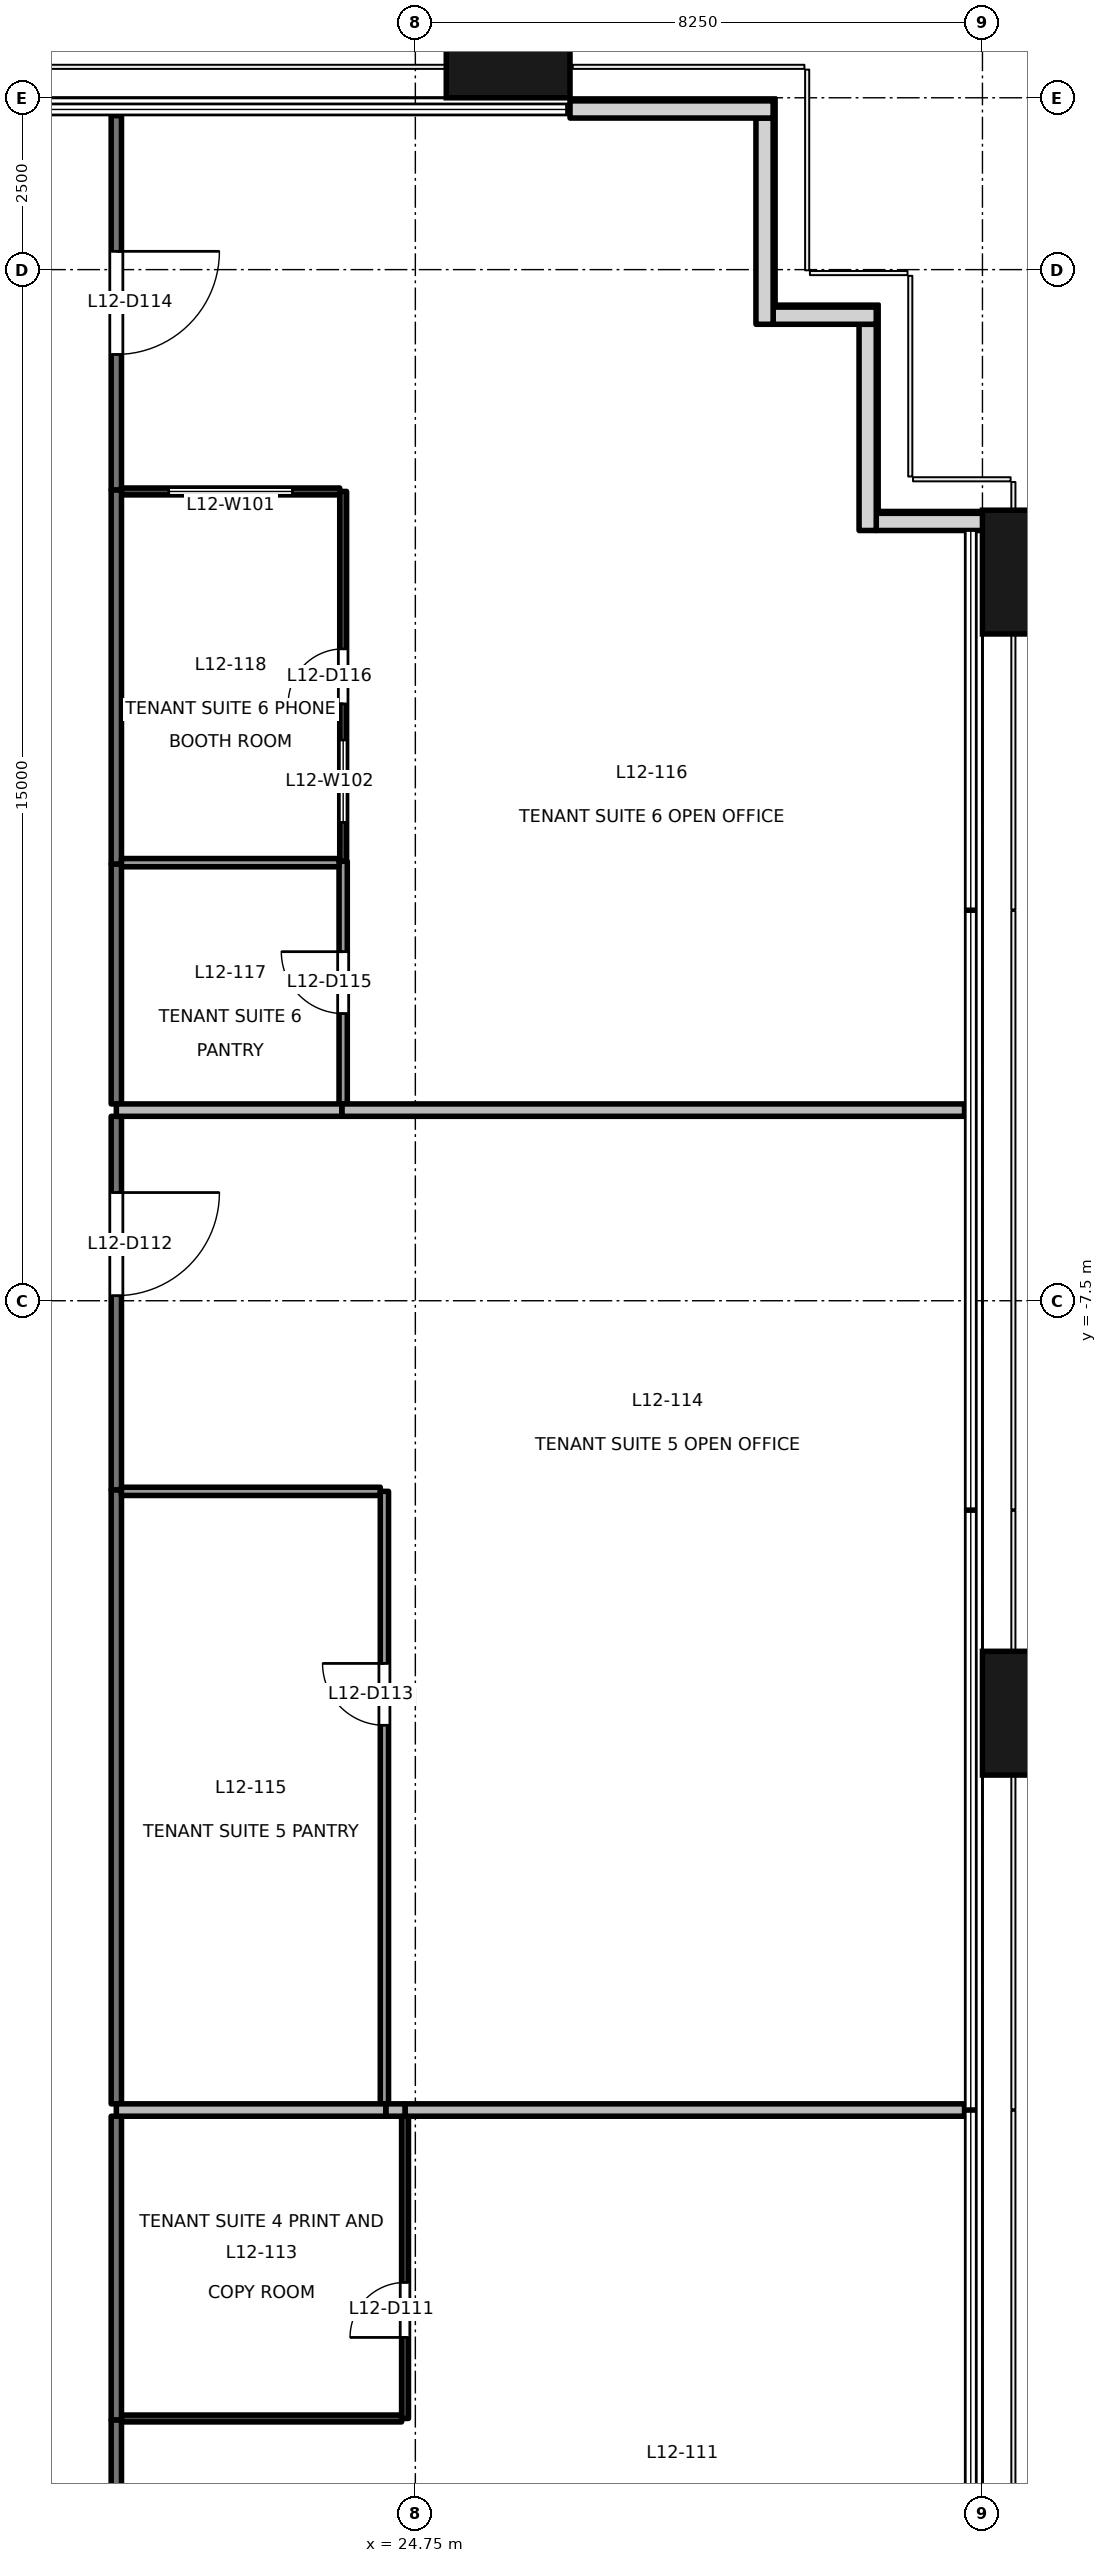
"""IFC4 building model, lengths in metres.
Left out: names, types, materials, properties, quantities, classifications, styles, units other than length and angle.
Written with IfcOpenShell. Run it as: python <this file> out.ifc"""

import sys

from ifc_helpers import new_model, si_unit, direction, frame, frame_2d, origin, origin_2d, place, context, subcontext, project, spatial, rectangle, extrude, element, fill, save


model = new_model("IFC4")
c1 = context("Model", 3, precision=1e-05, world=origin(), true_north=direction((0.0, 1.0)))
c2 = subcontext(c1, "Body", "Model", "MODEL_VIEW")
j1 = project(units=[si_unit("LENGTHUNIT", "METRE"), si_unit("PLANEANGLEUNIT", "RADIAN")], contexts=[c1])
p1 = place(None, origin())
s1 = spatial("IfcSite", under=j1, at=p1, CompositionType="ELEMENT")
p2 = place(p1, origin())
s2 = spatial("IfcBuilding", under=s1, at=p2, CompositionType="ELEMENT")
p3 = place(p2, frame((0.0, 0.0, 57.0)))
s3 = spatial("IfcBuildingStorey", under=s2, at=p3, CompositionType="ELEMENT", Elevation=57.0)
for number, where, z_axis, x_axis in (
    (1, (33.9, -13.5, -0.2), (0.0, 0.0, 1.0), (0.0, 1.0, 0.0)),
    (2, (33.9, 3.1, -0.2), (0.0, 0.0, 1.0), (0.0, 1.0, 0.0)),
    (3, (26.1, 10.9, -0.2), (0.0, 0.0, 1.0), (1.0, 0.0, 0.0)),
):
    element("IfcColumn", number, at=place(p3, frame(where, z_axis=z_axis, x_axis=x_axis)), inside=s3, PredefinedType="COLUMN", context=c2, shape_type="SweptSolid", body=[
        extrude(rectangle(XDim=1.8, YDim=1.8, at=origin_2d()), origin(), (0.0, 0.0, 1.0), 4.1),
    ])
p4 = place(p3, frame((33.005, 3.83, 0.0), z_axis=(0.0, 0.0, 1.0), x_axis=(-1.0, 0.0, 0.0)))
e4 = element("IfcWall", 4, at=p4, inside=s3, PredefinedType="SOLIDWALL", context=c2, shape_type="SweptSolid", body=[
    extrude(rectangle(XDim=1.55, YDim=0.25, at=frame_2d((0.775, 0.0))), origin(), (0.0, 0.0, 1.0), 3.9),
])
p5 = place(p3, frame((31.33, 3.705, 0.0), z_axis=(0.0, 0.0, 1.0), x_axis=(0.0, 1.0, 0.0)))
e5 = element("IfcWall", 5, at=p5, inside=s3, PredefinedType="SOLIDWALL", context=c2, shape_type="SweptSolid", body=[
    extrude(rectangle(XDim=3.0, YDim=0.25, at=frame_2d((1.5, 0.0))), origin(), (0.0, 0.0, 1.0), 3.9),
])
p6 = place(p3, frame((31.455, 6.83, 0.0), z_axis=(0.0, 0.0, 1.0), x_axis=(-1.0, 0.0, 0.0)))
e6 = element("IfcWall", 6, at=p6, inside=s3, PredefinedType="SOLIDWALL", context=c2, shape_type="SweptSolid", body=[
    extrude(rectangle(XDim=1.5, YDim=0.25, at=frame_2d((0.75, 0.0))), origin(), (0.0, 0.0, 1.0), 3.9),
])
p7 = place(p3, frame((29.83, 6.705, 0.0), z_axis=(0.0, 0.0, 1.0), x_axis=(0.0, 1.0, 0.0)))
e7 = element("IfcWall", 7, at=p7, inside=s3, PredefinedType="SOLIDWALL", context=c2, shape_type="SweptSolid", body=[
    extrude(rectangle(XDim=3.0, YDim=0.25, at=frame_2d((1.5, 0.0))), origin(), (0.0, 0.0, 1.0), 3.9),
])
p8 = place(p3, frame((29.955, 9.83, 0.0), z_axis=(0.0, 0.0, 1.0), x_axis=(-1.0, 0.0, 0.0)))
e8 = element("IfcWall", 8, at=p8, inside=s3, PredefinedType="SOLIDWALL", context=c2, shape_type="SweptSolid", body=[
    extrude(rectangle(XDim=2.955, YDim=0.25, at=frame_2d((1.478, 0.0))), origin(), (0.0, 0.0, 1.0), 3.9),
])
p9 = place(p3, frame((20.4, -23.78, 0.0), z_axis=(0.0, 0.0, 1.0), x_axis=(0.0, -1.0, 0.0)))
e9 = element("IfcWall", 9, at=p9, inside=s3, PredefinedType="PARTITIONING", context=c2, shape_type="SweptSolid", body=[
    extrude(rectangle(XDim=3.86, YDim=0.15, at=frame_2d((1.93, 0.0))), origin(), (0.0, 0.0, 1.0), 3.3),
])
p10 = place(p9, frame((2.095, 0.0, 0.0)))
e10 = element("IfcOpeningElement", 10, at=p10, cuts=e9, PredefinedType="OPENING", context=c2, shape_type="SweptSolid", body=[
    extrude(rectangle(XDim=0.9, YDim=2.1, at=frame_2d((0.45, 1.05))), frame((0.0, 0.085, 0.0), z_axis=(0.0, -1.0, 0.0), x_axis=(1.0, 0.0, 0.0)), (0.0, 0.0, 1.0), 0.171),
])
p11 = place(p3, frame((20.4, -19.363, 0.0), z_axis=(0.0, 0.0, 1.0), x_axis=(0.0, -1.0, 0.0)))
e11 = element("IfcWall", 11, at=p11, inside=s3, PredefinedType="PARTITIONING", context=c2, shape_type="SweptSolid", body=[
    extrude(rectangle(XDim=4.417, YDim=0.15, at=frame_2d((2.208, 0.0))), origin(), (0.0, 0.0, 1.0), 3.3),
])
p12 = place(p3, frame((20.4, -4.817, 0.0), z_axis=(0.0, 0.0, 1.0), x_axis=(0.0, -1.0, 0.0)))
e12 = element("IfcWall", 12, at=p12, inside=s3, PredefinedType="PARTITIONING", context=c2, shape_type="SweptSolid", body=[
    extrude(rectangle(XDim=5.436, YDim=0.15, at=frame_2d((2.718, 0.0))), origin(), (0.0, 0.0, 1.0), 3.3),
])
p13 = place(p12, frame((1.109, 0.0, 0.0)))
e13 = element("IfcOpeningElement", 13, at=p13, cuts=e12, PredefinedType="OPENING", context=c2, shape_type="SweptSolid", body=[
    extrude(rectangle(XDim=1.5, YDim=2.1, at=frame_2d((0.75, 1.05))), frame((0.0, 0.085, 0.0), z_axis=(0.0, -1.0, 0.0), x_axis=(1.0, 0.0, 0.0)), (0.0, 0.0, 1.0), 0.171),
])
p14 = place(p3, frame((20.4, -10.253, 0.0), z_axis=(0.0, 0.0, 1.0), x_axis=(0.0, -1.0, 0.0)))
e14 = element("IfcWall", 14, at=p14, inside=s3, PredefinedType="PARTITIONING", context=c2, shape_type="SweptSolid", body=[
    extrude(rectangle(XDim=8.93, YDim=0.15, at=frame_2d((4.465, 0.0))), origin(), (0.0, 0.0, 1.0), 3.3),
])
p15 = place(p3, frame((20.4, 9.74, 0.0), z_axis=(0.0, 0.0, 1.0), x_axis=(0.0, -1.0, 0.0)))
e15 = element("IfcWall", 15, at=p15, inside=s3, PredefinedType="PARTITIONING", context=c2, shape_type="SweptSolid", body=[
    extrude(rectangle(XDim=5.447, YDim=0.15, at=frame_2d((2.724, 0.0))), origin(), (0.0, 0.0, 1.0), 3.9),
])
p16 = place(p15, frame((1.974, 0.0, 0.0)))
e16 = element("IfcOpeningElement", 16, at=p16, cuts=e15, PredefinedType="OPENING", context=c2, shape_type="SweptSolid", body=[
    extrude(rectangle(XDim=1.5, YDim=2.1, at=frame_2d((0.75, 1.05))), frame((0.0, 0.085, 0.0), z_axis=(0.0, -1.0, 0.0), x_axis=(1.0, 0.0, 0.0)), (0.0, 0.0, 1.0), 0.171),
])
p17 = place(p3, frame((20.4, -1.147, 0.0), z_axis=(0.0, 0.0, 1.0), x_axis=(0.0, -1.0, 0.0)))
e17 = element("IfcWall", 17, at=p17, inside=s3, PredefinedType="PARTITIONING", context=c2, shape_type="SweptSolid", body=[
    extrude(rectangle(XDim=3.49, YDim=0.15, at=frame_2d((1.745, 0.0))), origin(), (0.0, 0.0, 1.0), 3.3),
])
p18 = place(p3, frame((20.4, 4.293, 0.0), z_axis=(0.0, 0.0, 1.0), x_axis=(0.0, -1.0, 0.0)))
e18 = element("IfcWall", 18, at=p18, inside=s3, PredefinedType="PARTITIONING", context=c2, shape_type="SweptSolid", body=[
    extrude(rectangle(XDim=5.44, YDim=0.15, at=frame_2d((2.72, 0.0))), origin(), (0.0, 0.0, 1.0), 3.3),
])
p19 = place(p3, frame((20.475, -23.76, 0.0), z_axis=(0.0, 0.0, 1.0), x_axis=(1.0, 0.0, 0.0)))
e19 = element("IfcWall", 19, at=p19, inside=s3, PredefinedType="PARTITIONING", context=c2, shape_type="SweptSolid", body=[
    extrude(rectangle(XDim=4.075, YDim=0.1, at=frame_2d((2.038, 0.0))), origin(), (0.0, 0.0, 1.0), 3.9),
])
p20 = place(p3, frame((24.6, -23.76, 0.0), z_axis=(0.0, 0.0, 1.0), x_axis=(0.0, 1.0, 0.0)))
e20 = element("IfcWall", 20, at=p20, inside=s3, PredefinedType="PARTITIONING", context=c2, shape_type="SweptSolid", body=[
    extrude(rectangle(XDim=4.397, YDim=0.1, at=frame_2d((2.198, 0.0))), origin(), (0.0, 0.0, 1.0), 3.3),
])
p21 = place(p20, frame((1.179, 0.0, 0.0)))
e21 = element("IfcOpeningElement", 21, at=p21, cuts=e20, PredefinedType="OPENING", context=c2, shape_type="SweptSolid", body=[
    extrude(rectangle(XDim=0.8, YDim=2.1, at=frame_2d((0.4, 1.05))), frame((0.0, 0.061, 0.0), z_axis=(0.0, -1.0, 0.0), x_axis=(1.0, 0.0, 0.0)), (0.0, 0.0, 1.0), 0.121),
])
p22 = place(p3, frame((24.6, -19.273, 0.0), z_axis=(0.0, 0.0, 1.0), x_axis=(1.0, 0.0, 0.0)))
e22 = element("IfcWall", 22, at=p22, inside=s3, PredefinedType="PARTITIONING", context=c2, shape_type="SweptSolid", body=[
    extrude(rectangle(XDim=8.14, YDim=0.18, at=frame_2d((4.07, 0.0))), origin(), (0.0, 0.0, 1.0), 3.9),
])
p23 = place(p3, frame((24.32, -19.273, 0.0), z_axis=(0.0, 0.0, 1.0), x_axis=(1.0, 0.0, 0.0)))
e23 = element("IfcWall", 23, at=p23, inside=s3, PredefinedType="PARTITIONING", context=c2, shape_type="SweptSolid", body=[
    extrude(rectangle(XDim=0.28, YDim=0.18, at=frame_2d((0.14, 0.0))), origin(), (0.0, 0.0, 1.0), 3.9),
])
p24 = place(p3, frame((20.4, -19.273, 0.0), z_axis=(0.0, 0.0, 1.0), x_axis=(1.0, 0.0, 0.0)))
e24 = element("IfcWall", 24, at=p24, inside=s3, PredefinedType="PARTITIONING", context=c2, shape_type="SweptSolid", body=[
    extrude(rectangle(XDim=3.92, YDim=0.18, at=frame_2d((1.96, 0.0))), origin(), (0.0, 0.0, 1.0), 3.9),
])
p25 = place(p3, frame((24.24, -10.273, 0.0), z_axis=(0.0, 0.0, 1.0), x_axis=(-1.0, 0.0, 0.0)))
e25 = element("IfcWall", 25, at=p25, inside=s3, PredefinedType="PARTITIONING", context=c2, shape_type="SweptSolid", body=[
    extrude(rectangle(XDim=3.765, YDim=0.12, at=frame_2d((1.882, 0.0))), origin(), (0.0, 0.0, 1.0), 3.9),
])
p26 = place(p3, frame((24.3, -19.183, 0.0), z_axis=(0.0, 0.0, 1.0), x_axis=(0.0, 1.0, 0.0)))
e26 = element("IfcWall", 26, at=p26, inside=s3, PredefinedType="PARTITIONING", context=c2, shape_type="SweptSolid", body=[
    extrude(rectangle(XDim=8.91, YDim=0.12, at=frame_2d((4.455, 0.0))), origin(), (0.0, 0.0, 1.0), 3.3),
])
p27 = place(p26, frame((5.507, 0.0, 0.0)))
e27 = element("IfcOpeningElement", 27, at=p27, cuts=e26, PredefinedType="OPENING", context=c2, shape_type="SweptSolid", body=[
    extrude(rectangle(XDim=0.9, YDim=2.1, at=frame_2d((0.45, 1.05))), frame((0.0, 0.071, 0.0), z_axis=(0.0, -1.0, 0.0), x_axis=(1.0, 0.0, 0.0)), (0.0, 0.0, 1.0), 0.141),
])
p28 = place(p3, frame((23.68, -4.727, 0.0), z_axis=(0.0, 0.0, 1.0), x_axis=(1.0, 0.0, 0.0)))
e28 = element("IfcWall", 28, at=p28, inside=s3, PredefinedType="PARTITIONING", context=c2, shape_type="SweptSolid", body=[
    extrude(rectangle(XDim=9.06, YDim=0.18, at=frame_2d((4.53, 0.0))), origin(), (0.0, 0.0, 1.0), 3.3),
])
p29 = place(p3, frame((20.4, -4.727, 0.0), z_axis=(0.0, 0.0, 1.0), x_axis=(1.0, 0.0, 0.0)))
e29 = element("IfcWall", 29, at=p29, inside=s3, PredefinedType="PARTITIONING", context=c2, shape_type="SweptSolid", body=[
    extrude(rectangle(XDim=3.28, YDim=0.18, at=frame_2d((1.64, 0.0))), origin(), (0.0, 0.0, 1.0), 3.3),
])
p30 = place(p3, frame((23.7, -4.637, 0.0), z_axis=(0.0, 0.0, 1.0), x_axis=(0.0, 1.0, 0.0)))
e30 = element("IfcWall", 30, at=p30, inside=s3, PredefinedType="PARTITIONING", context=c2, shape_type="SweptSolid", body=[
    extrude(rectangle(XDim=3.53, YDim=0.12, at=frame_2d((1.765, 0.0))), origin(), (0.0, 0.0, 1.0), 3.3),
])
p31 = place(p30, frame((1.315, 0.0, 0.0)))
e31 = element("IfcOpeningElement", 31, at=p31, cuts=e30, PredefinedType="OPENING", context=c2, shape_type="SweptSolid", body=[
    extrude(rectangle(XDim=0.9, YDim=2.1, at=frame_2d((0.45, 1.05))), frame((0.0, 0.071, 0.0), z_axis=(0.0, -1.0, 0.0), x_axis=(1.0, 0.0, 0.0)), (0.0, 0.0, 1.0), 0.141),
])
p32 = place(p3, frame((23.65, 4.273, 0.0), z_axis=(0.0, 0.0, 1.0), x_axis=(-1.0, 0.0, 0.0)))
e32 = element("IfcWall", 32, at=p32, inside=s3, PredefinedType="PARTITIONING", context=c2, shape_type="SweptSolid", body=[
    extrude(rectangle(XDim=3.175, YDim=0.1, at=frame_2d((1.587, 0.0))), origin(), (0.0, 0.0, 1.0), 3.9),
])
p33 = place(p32, frame((0.688, 0.0, 0.9)))
e33 = element("IfcOpeningElement", 33, at=p33, cuts=e32, PredefinedType="OPENING", context=c2, shape_type="SweptSolid", body=[
    extrude(rectangle(XDim=1.8, YDim=1.2, at=frame_2d((0.9, 0.6))), frame((0.0, 0.061, 0.0), z_axis=(0.0, -1.0, 0.0), x_axis=(1.0, 0.0, 0.0)), (0.0, 0.0, 1.0), 0.121),
])
p34 = place(p3, frame((23.7, -1.107, 0.0), z_axis=(0.0, 0.0, 1.0), x_axis=(0.0, 1.0, 0.0)))
e34 = element("IfcWall", 34, at=p34, inside=s3, PredefinedType="PARTITIONING", context=c2, shape_type="SweptSolid", body=[
    extrude(rectangle(XDim=5.38, YDim=0.1, at=frame_2d((2.69, 0.0))), origin(), (0.0, 0.0, 1.0), 3.3),
])
p35 = place(p34, frame((2.29, 0.0, 0.0)))
e35 = element("IfcOpeningElement", 35, at=p35, cuts=e34, PredefinedType="OPENING", context=c2, shape_type="SweptSolid", body=[
    extrude(rectangle(XDim=0.8, YDim=2.1, at=frame_2d((0.4, 1.05))), frame((0.0, 0.061, 0.0), z_axis=(0.0, -1.0, 0.0), x_axis=(1.0, 0.0, 0.0)), (0.0, 0.0, 1.0), 0.121),
])
p36 = place(p34, frame((0.565, 0.0, 0.9)))
e36 = element("IfcOpeningElement", 36, at=p36, cuts=e34, PredefinedType="OPENING", context=c2, shape_type="SweptSolid", body=[
    extrude(rectangle(XDim=1.2, YDim=1.2, at=frame_2d((0.6, 0.6))), frame((0.0, 0.061, 0.0), z_axis=(0.0, -1.0, 0.0), x_axis=(1.0, 0.0, 0.0)), (0.0, 0.0, 1.0), 0.121),
])
p37 = place(p3, frame((20.475, -1.127, 0.0), z_axis=(0.0, 0.0, 1.0), x_axis=(1.0, 0.0, 0.0)))
e37 = element("IfcWall", 37, at=p37, inside=s3, PredefinedType="PARTITIONING", context=c2, shape_type="SweptSolid", body=[
    extrude(rectangle(XDim=3.165, YDim=0.12, at=frame_2d((1.583, 0.0))), origin(), (0.0, 0.0, 1.0), 3.9),
])
p38 = place(p21, origin())
e38 = element("IfcDoor", 38, at=p38, inside=s3, OperationType="SINGLE_SWING_LEFT", PredefinedType="DOOR", context=c2, shape_type="SweptSolid", body=[
    extrude(rectangle(XDim=0.8, YDim=2.1, at=frame_2d((0.4, 1.05))), frame((0.0, 0.025, 0.0), z_axis=(0.0, -1.0, 0.0), x_axis=(1.0, 0.0, 0.0)), (0.0, 0.0, 1.0), 0.05),
])
fill(e21, e38)
p39 = place(p13, origin())
e39 = element("IfcDoor", 39, at=p39, inside=s3, OperationType="DOUBLE_DOOR_SINGLE_SWING", PredefinedType="DOOR", context=c2, shape_type="SweptSolid", body=[
    extrude(rectangle(XDim=1.5, YDim=2.1, at=frame_2d((0.75, 1.05))), frame((0.0, 0.025, 0.0), z_axis=(0.0, -1.0, 0.0), x_axis=(1.0, 0.0, 0.0)), (0.0, 0.0, 1.0), 0.05),
])
fill(e13, e39)
p40 = place(p27, origin())
e40 = element("IfcDoor", 40, at=p40, inside=s3, OperationType="SINGLE_SWING_RIGHT", PredefinedType="DOOR", context=c2, shape_type="SweptSolid", body=[
    extrude(rectangle(XDim=0.9, YDim=2.1, at=frame_2d((0.45, 1.05))), frame((0.0, 0.025, 0.0), z_axis=(0.0, -1.0, 0.0), x_axis=(1.0, 0.0, 0.0)), (0.0, 0.0, 1.0), 0.05),
])
fill(e27, e40)
p41 = place(p16, origin())
e41 = element("IfcDoor", 41, at=p41, inside=s3, OperationType="DOUBLE_DOOR_SINGLE_SWING", PredefinedType="DOOR", context=c2, shape_type="SweptSolid", body=[
    extrude(rectangle(XDim=1.5, YDim=2.1, at=frame_2d((0.75, 1.05))), frame((0.0, 0.025, 0.0), z_axis=(0.0, -1.0, 0.0), x_axis=(1.0, 0.0, 0.0)), (0.0, 0.0, 1.0), 0.05),
])
fill(e16, e41)
p42 = place(p31, origin())
e42 = element("IfcDoor", 42, at=p42, inside=s3, OperationType="SINGLE_SWING_RIGHT", PredefinedType="DOOR", context=c2, shape_type="SweptSolid", body=[
    extrude(rectangle(XDim=0.9, YDim=2.1, at=frame_2d((0.45, 1.05))), frame((0.0, 0.025, 0.0), z_axis=(0.0, -1.0, 0.0), x_axis=(1.0, 0.0, 0.0)), (0.0, 0.0, 1.0), 0.05),
])
fill(e31, e42)
p43 = place(p35, origin())
e43 = element("IfcDoor", 43, at=p43, inside=s3, OperationType="SINGLE_SWING_LEFT", PredefinedType="DOOR", context=c2, shape_type="SweptSolid", body=[
    extrude(rectangle(XDim=0.8, YDim=2.1, at=frame_2d((0.4, 1.05))), frame((0.0, 0.025, 0.0), z_axis=(0.0, -1.0, 0.0), x_axis=(1.0, 0.0, 0.0)), (0.0, 0.0, 1.0), 0.05),
])
fill(e35, e43)
p44 = place(p33, origin())
e44 = element("IfcWindow", 44, at=p44, inside=s3, PartitioningType="SINGLE_PANEL", PredefinedType="WINDOW", context=c2, shape_type="SweptSolid", body=[
    extrude(rectangle(XDim=1.8, YDim=1.2, at=frame_2d((0.9, 0.6))), frame((0.0, 0.03, 0.0), z_axis=(0.0, -1.0, 0.0), x_axis=(1.0, 0.0, 0.0)), (0.0, 0.0, 1.0), 0.06),
])
fill(e33, e44)
p45 = place(p36, origin())
e45 = element("IfcWindow", 45, at=p45, inside=s3, PartitioningType="SINGLE_PANEL", PredefinedType="WINDOW", context=c2, shape_type="SweptSolid", body=[
    extrude(rectangle(XDim=1.2, YDim=1.2, at=frame_2d((0.6, 0.6))), frame((0.0, 0.03, 0.0), z_axis=(0.0, -1.0, 0.0), x_axis=(1.0, 0.0, 0.0)), (0.0, 0.0, 1.0), 0.06),
])
fill(e36, e45)
save(model, sys.argv[1])
